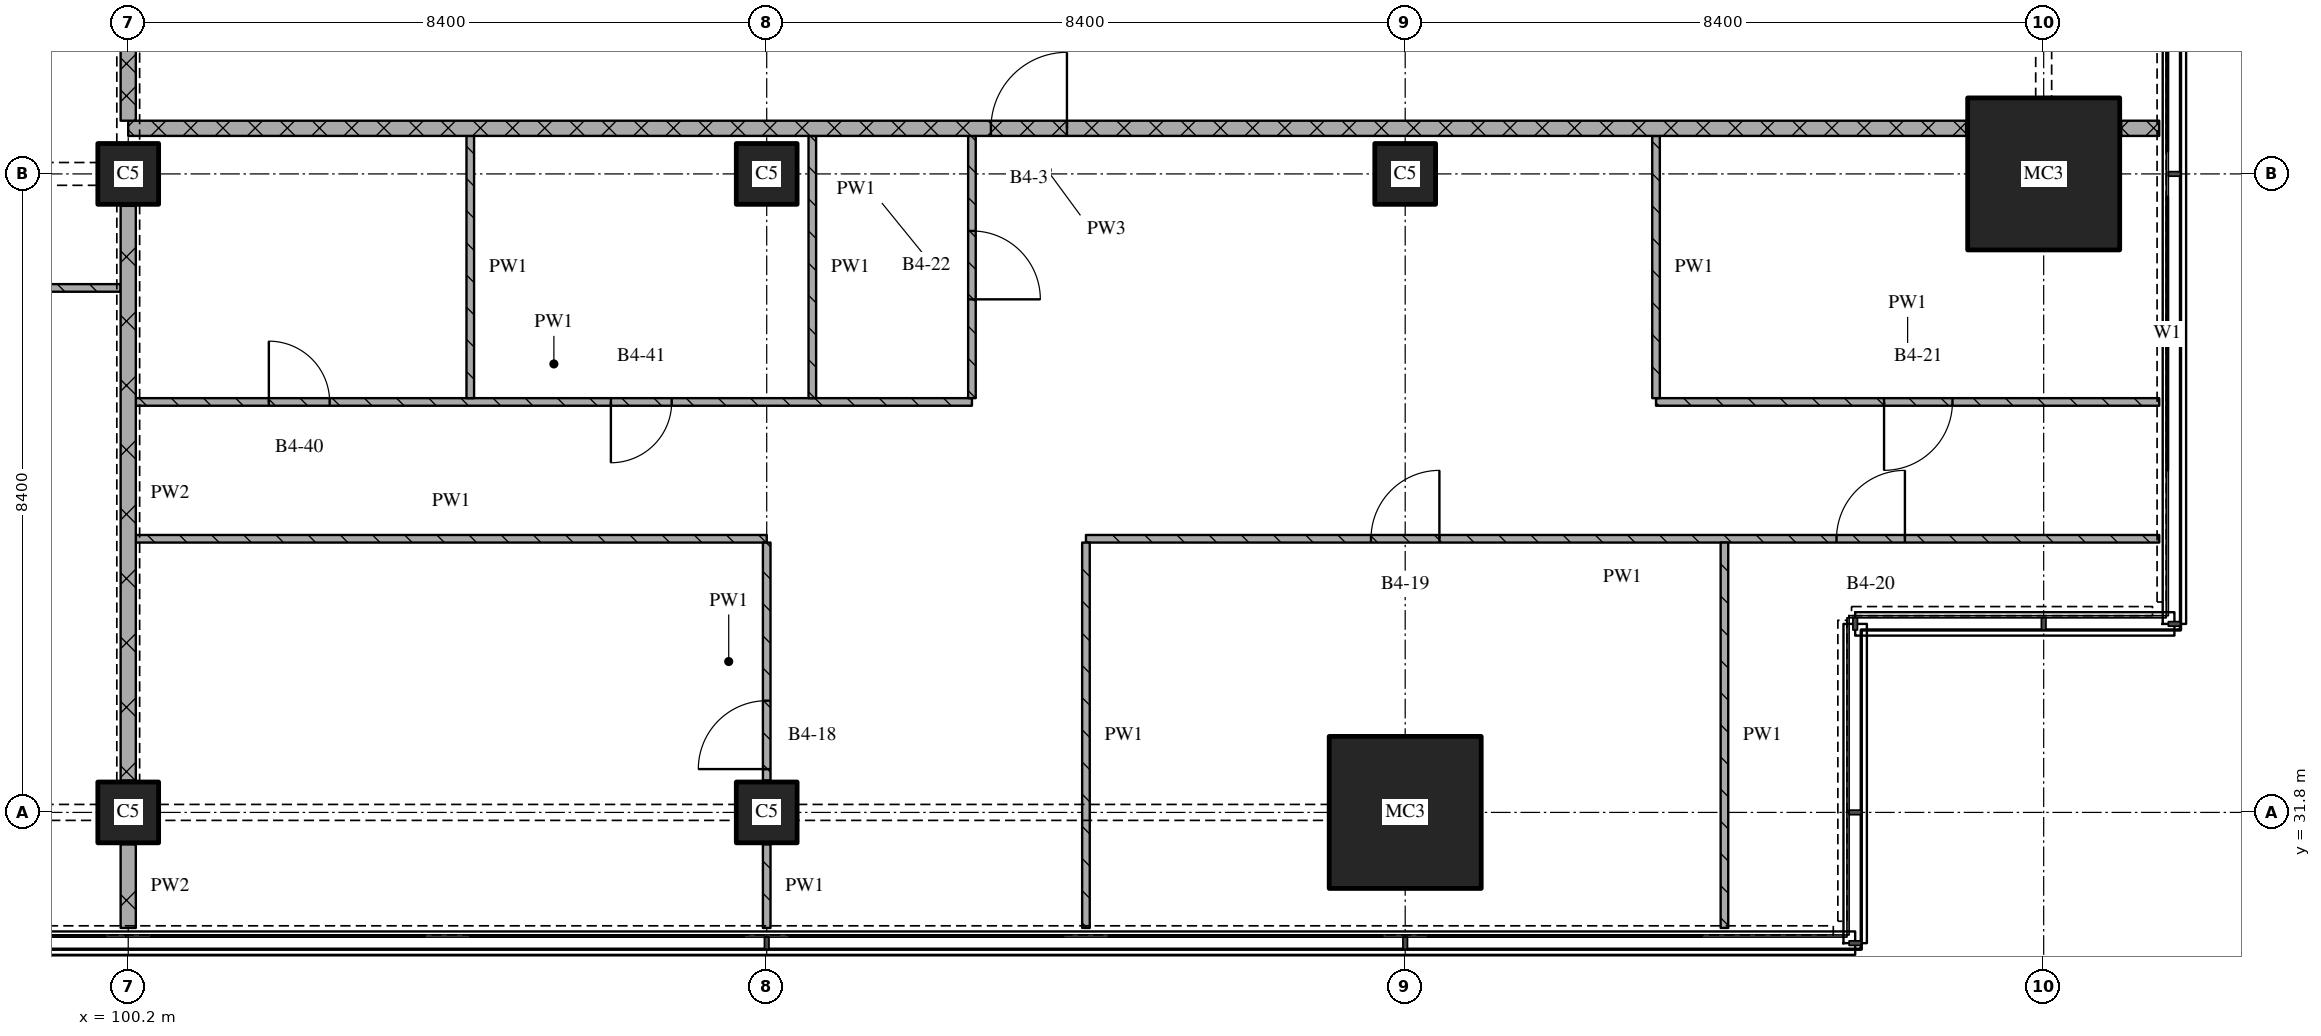
"""IFC4 building model, lengths in metres.
Left out: names, types, materials, properties, quantities, classifications, styles, units other than length and angle.
Written with IfcOpenShell. Run it as: python <this file> out.ifc"""

import sys

from ifc_helpers import new_model, si_unit, direction, frame, frame_2d, origin, origin_2d, place, context, subcontext, project, spatial, rectangle, extrude, element, fill, save


model = new_model("IFC4")
c1 = context("Model", 3, precision=1e-05, world=origin(), true_north=direction((0.0, 1.0)))
c2 = subcontext(c1, "Body", "Model", "MODEL_VIEW")
j1 = project(units=[si_unit("LENGTHUNIT", "METRE"), si_unit("PLANEANGLEUNIT", "RADIAN")], contexts=[c1])
p1 = place(None, origin())
s1 = spatial("IfcSite", under=j1, at=p1, CompositionType="ELEMENT")
p2 = place(p1, origin())
s2 = spatial("IfcBuilding", under=s1, at=p2, CompositionType="ELEMENT")
p3 = place(p2, frame((0.0, 0.0, 134.85)))
s3 = spatial("IfcBuildingStorey", under=s2, at=p3, CompositionType="ELEMENT", Elevation=134.85)
for number, where, z_axis, x_axis in (
    (1, (100.2, 31.8, 0.0), (0.0, 0.0, 1.0), (1.0, 0.0, 0.0)),
    (2, (100.2, 40.2, 0.0), (0.0, 0.0, 1.0), (1.0, 0.0, 0.0)),
    (3, (108.6, 31.8, 0.0), (0.0, 0.0, 1.0), (1.0, 0.0, 0.0)),
    (4, (108.6, 40.2, 0.0), (0.0, 0.0, 1.0), (1.0, 0.0, 0.0)),
):
    element("IfcColumn", number, at=place(p3, frame(where, z_axis=z_axis, x_axis=x_axis)), inside=s3, PredefinedType="COLUMN", context=c2, shape_type="SweptSolid", body=[
        extrude(rectangle(XDim=0.8, YDim=0.8, at=origin_2d()), origin(), (0.0, 0.0, 1.0), 3.6),
    ])
p4 = place(p3, frame((117.0, 31.8, 0.0), z_axis=(0.0, 0.0, 1.0), x_axis=(1.0, 0.0, 0.0)))
e5 = element("IfcColumn", 5, at=p4, inside=s3, PredefinedType="COLUMN", context=c2, shape_type="SweptSolid", body=[
    extrude(rectangle(XDim=2.0, YDim=2.0, at=origin_2d()), origin(), (0.0, 0.0, 1.0), 3.6),
])
p5 = place(p3, frame((117.0, 40.2, 0.0), z_axis=(0.0, 0.0, 1.0), x_axis=(1.0, 0.0, 0.0)))
e6 = element("IfcColumn", 6, at=p5, inside=s3, PredefinedType="COLUMN", context=c2, shape_type="SweptSolid", body=[
    extrude(rectangle(XDim=0.8, YDim=0.8, at=origin_2d()), origin(), (0.0, 0.0, 1.0), 3.6),
])
p6 = place(p3, frame((125.4, 40.2, 0.0), z_axis=(0.0, 0.0, 1.0), x_axis=(1.0, 0.0, 0.0)))
e7 = element("IfcColumn", 7, at=p6, inside=s3, PredefinedType="COLUMN", context=c2, shape_type="SweptSolid", body=[
    extrude(rectangle(XDim=2.0, YDim=2.0, at=origin_2d()), origin(), (0.0, 0.0, 1.0), 3.6),
])
p7 = place(p3, frame((100.3, 35.4, 0.0), z_axis=(0.0, 0.0, 1.0), x_axis=(1.0, 0.0, 0.0)))
e8 = element("IfcWall", 8, at=p7, inside=s3, PredefinedType="PARTITIONING", context=c2, shape_type="SweptSolid", body=[
    extrude(rectangle(XDim=8.3, YDim=0.1, at=frame_2d((4.15, 0.0))), origin(), (0.0, 0.0, 1.0), 3.32),
])
p8 = place(p3, frame((126.92, 35.4, 0.0), z_axis=(0.0, 0.0, 1.0), x_axis=(-1.0, 0.0, 0.0)))
e9 = element("IfcWall", 9, at=p8, inside=s3, PredefinedType="PARTITIONING", context=c2, shape_type="SweptSolid", body=[
    extrude(rectangle(XDim=14.12, YDim=0.1, at=frame_2d((7.06, 0.0))), origin(), (0.0, 0.0, 1.0), 3.32),
])
p9 = place(p8, frame((3.346, 0.0, 0.0)))
e10 = element("IfcOpeningElement", 10, at=p9, cuts=e9, PredefinedType="OPENING", context=c2, shape_type="SweptSolid", body=[
    extrude(rectangle(XDim=0.9, YDim=2.1, at=frame_2d((0.45, 1.05))), frame((0.0, 0.06, 0.0), z_axis=(0.0, -1.0, 0.0), x_axis=(1.0, 0.0, 0.0)), (0.0, 0.0, 1.0), 0.12),
])
p10 = place(p8, frame((9.47, 0.0, 0.0)))
e11 = element("IfcOpeningElement", 11, at=p10, cuts=e9, PredefinedType="OPENING", context=c2, shape_type="SweptSolid", body=[
    extrude(rectangle(XDim=0.9, YDim=2.1, at=frame_2d((0.45, 1.05))), frame((0.0, 0.06, 0.0), z_axis=(0.0, -1.0, 0.0), x_axis=(1.0, 0.0, 0.0)), (0.0, 0.0, 1.0), 0.12),
])
p11 = place(p3, frame((100.3, 37.2, 0.0), z_axis=(0.0, 0.0, 1.0), x_axis=(1.0, 0.0, 0.0)))
e12 = element("IfcWall", 12, at=p11, inside=s3, PredefinedType="PARTITIONING", context=c2, shape_type="SweptSolid", body=[
    extrude(rectangle(XDim=11.0, YDim=0.1, at=frame_2d((5.5, 0.0))), origin(), (0.0, 0.0, 1.0), 3.32),
])
p12 = place(p11, frame((1.75, 0.0, 0.0)))
e13 = element("IfcOpeningElement", 13, at=p12, cuts=e12, PredefinedType="OPENING", context=c2, shape_type="SweptSolid", body=[
    extrude(rectangle(XDim=0.8, YDim=2.1, at=frame_2d((0.4, 1.05))), frame((0.0, 0.06, 0.0), z_axis=(0.0, -1.0, 0.0), x_axis=(1.0, 0.0, 0.0)), (0.0, 0.0, 1.0), 0.12),
])
p13 = place(p11, frame((6.25, 0.0, 0.0)))
e14 = element("IfcOpeningElement", 14, at=p13, cuts=e12, PredefinedType="OPENING", context=c2, shape_type="SweptSolid", body=[
    extrude(rectangle(XDim=0.8, YDim=2.1, at=frame_2d((0.4, 1.05))), frame((0.0, 0.06, 0.0), z_axis=(0.0, -1.0, 0.0), x_axis=(1.0, 0.0, 0.0)), (0.0, 0.0, 1.0), 0.12),
])
p14 = place(p3, frame((120.3, 37.2, 0.0), z_axis=(0.0, 0.0, 1.0), x_axis=(1.0, 0.0, 0.0)))
e15 = element("IfcWall", 15, at=p14, inside=s3, PredefinedType="PARTITIONING", context=c2, shape_type="SweptSolid", body=[
    extrude(rectangle(XDim=6.62, YDim=0.1, at=frame_2d((3.31, 0.0))), origin(), (0.0, 0.0, 1.0), 3.32),
])
p15 = place(p14, frame((3.0, 0.0, 0.0)))
e16 = element("IfcOpeningElement", 16, at=p15, cuts=e15, PredefinedType="OPENING", context=c2, shape_type="SweptSolid", body=[
    extrude(rectangle(XDim=0.9, YDim=2.1, at=frame_2d((0.45, 1.05))), frame((0.0, 0.06, 0.0), z_axis=(0.0, -1.0, 0.0), x_axis=(1.0, 0.0, 0.0)), (0.0, 0.0, 1.0), 0.12),
])
p16 = place(p3, frame((91.2, 38.7, 0.0), z_axis=(0.0, 0.0, 1.0), x_axis=(1.0, 0.0, 0.0)))
e17 = element("IfcWall", 17, at=p16, inside=s3, PredefinedType="PARTITIONING", context=c2, shape_type="SweptSolid", body=[
    extrude(rectangle(XDim=8.9, YDim=0.1, at=frame_2d((4.45, 0.0))), origin(), (0.0, 0.0, 1.0), 3.32),
])
p17 = place(p16, frame((4.05, 0.0, 0.0)))
e18 = element("IfcOpeningElement", 18, at=p17, cuts=e17, PredefinedType="OPENING", context=c2, shape_type="SweptSolid", body=[
    extrude(rectangle(XDim=0.9, YDim=2.1, at=frame_2d((0.45, 1.05))), frame((0.0, 0.06, 0.0), z_axis=(0.0, -1.0, 0.0), x_axis=(1.0, 0.0, 0.0)), (0.0, 0.0, 1.0), 0.12),
])
p18 = place(p3, frame((124.38, 40.8, 0.0), z_axis=(0.0, 0.0, 1.0), x_axis=(-1.0, 0.0, 0.0)))
e19 = element("IfcWall", 19, at=p18, inside=s3, PredefinedType="PARTITIONING", context=c2, shape_type="SweptSolid", body=[
    extrude(rectangle(XDim=24.18, YDim=0.2, at=frame_2d((12.09, 0.0))), origin(), (0.0, 0.0, 1.0), 3.32),
])
p19 = place(p18, frame((11.83, 0.0, 0.0)))
e20 = element("IfcOpeningElement", 20, at=p19, cuts=e19, PredefinedType="OPENING", context=c2, shape_type="SweptSolid", body=[
    extrude(rectangle(XDim=1.0, YDim=2.1, at=frame_2d((0.5, 1.05))), frame((0.0, 0.11, 0.0), z_axis=(0.0, -1.0, 0.0), x_axis=(1.0, 0.0, 0.0)), (0.0, 0.0, 1.0), 0.22),
])
p20 = place(p3, frame((126.42, 40.8, 0.0), z_axis=(0.0, 0.0, 1.0), x_axis=(1.0, 0.0, 0.0)))
e21 = element("IfcWall", 21, at=p20, inside=s3, PredefinedType="PARTITIONING", context=c2, shape_type="SweptSolid", body=[
    extrude(rectangle(XDim=0.5, YDim=0.2, at=frame_2d((0.25, 0.0))), origin(), (0.0, 0.0, 1.0), 3.32),
])
p21 = place(p3, frame((100.2, 43.1, 0.0), z_axis=(0.0, 0.0, 1.0), x_axis=(0.0, -1.0, 0.0)))
e22 = element("IfcWall", 22, at=p21, inside=s3, PredefinedType="PARTITIONING", context=c2, shape_type="SweptSolid", body=[
    extrude(rectangle(XDim=2.2, YDim=0.2, at=frame_2d((1.1, 0.0))), origin(), (0.0, 0.0, 1.0), 2.43),
])
p22 = place(p3, frame((100.2, 31.38, 0.0), z_axis=(0.0, 0.0, 1.0), x_axis=(0.0, -1.0, 0.0)))
e23 = element("IfcWall", 23, at=p22, inside=s3, PredefinedType="PARTITIONING", context=c2, shape_type="SweptSolid", body=[
    extrude(rectangle(XDim=1.1, YDim=0.2, at=frame_2d((0.55, 0.0))), origin(), (0.0, 0.0, 1.0), 3.32),
])
p23 = place(p3, frame((100.2, 39.78, 0.0), z_axis=(0.0, 0.0, 1.0), x_axis=(0.0, -1.0, 0.0)))
e24 = element("IfcWall", 24, at=p23, inside=s3, PredefinedType="PARTITIONING", context=c2, shape_type="SweptSolid", body=[
    extrude(rectangle(XDim=7.56, YDim=0.2, at=frame_2d((3.78, 0.0))), origin(), (0.0, 0.0, 1.0), 2.83),
])
p24 = place(p3, frame((104.7, 40.7, 0.0), z_axis=(0.0, 0.0, 1.0), x_axis=(0.0, -1.0, 0.0)))
e25 = element("IfcWall", 25, at=p24, inside=s3, PredefinedType="PARTITIONING", context=c2, shape_type="SweptSolid", body=[
    extrude(rectangle(XDim=3.45, YDim=0.1, at=frame_2d((1.725, 0.0))), origin(), (0.0, 0.0, 1.0), 3.32),
])
p25 = place(p3, frame((108.6, 31.38, 0.0), z_axis=(0.0, 0.0, 1.0), x_axis=(0.0, -1.0, 0.0)))
e26 = element("IfcWall", 26, at=p25, inside=s3, PredefinedType="PARTITIONING", context=c2, shape_type="SweptSolid", body=[
    extrude(rectangle(XDim=1.1, YDim=0.1, at=frame_2d((0.55, 0.0))), origin(), (0.0, 0.0, 1.0), 3.32),
])
p26 = place(p3, frame((108.6, 32.22, 0.0), z_axis=(0.0, 0.0, 1.0), x_axis=(0.0, 1.0, 0.0)))
e27 = element("IfcWall", 27, at=p26, inside=s3, PredefinedType="PARTITIONING", context=c2, shape_type="SweptSolid", body=[
    extrude(rectangle(XDim=3.13, YDim=0.1, at=frame_2d((1.565, 0.0))), origin(), (0.0, 0.0, 1.0), 3.32),
])
p27 = place(p26, frame((0.15, 0.0, 0.0)))
e28 = element("IfcOpeningElement", 28, at=p27, cuts=e27, PredefinedType="OPENING", context=c2, shape_type="SweptSolid", body=[
    extrude(rectangle(XDim=0.9, YDim=2.1, at=frame_2d((0.45, 1.05))), frame((0.0, 0.06, 0.0), z_axis=(0.0, -1.0, 0.0), x_axis=(1.0, 0.0, 0.0)), (0.0, 0.0, 1.0), 0.12),
])
p28 = place(p3, frame((109.2, 40.7, 0.0), z_axis=(0.0, 0.0, 1.0), x_axis=(0.0, -1.0, 0.0)))
e29 = element("IfcWall", 29, at=p28, inside=s3, PredefinedType="PARTITIONING", context=c2, shape_type="SweptSolid", body=[
    extrude(rectangle(XDim=3.45, YDim=0.1, at=frame_2d((1.725, 0.0))), origin(), (0.0, 0.0, 1.0), 3.32),
])
p29 = place(p3, frame((111.3, 37.25, 0.0), z_axis=(0.0, 0.0, 1.0), x_axis=(0.0, 1.0, 0.0)))
e30 = element("IfcWall", 30, at=p29, inside=s3, PredefinedType="PARTITIONING", context=c2, shape_type="SweptSolid", body=[
    extrude(rectangle(XDim=3.45, YDim=0.1, at=frame_2d((1.725, 0.0))), origin(), (0.0, 0.0, 1.0), 3.32),
])
p30 = place(p29, frame((1.3, 0.0, 0.0)))
e31 = element("IfcOpeningElement", 31, at=p30, cuts=e30, PredefinedType="OPENING", context=c2, shape_type="SweptSolid", body=[
    extrude(rectangle(XDim=0.9, YDim=2.1, at=frame_2d((0.45, 1.05))), frame((0.0, 0.06, 0.0), z_axis=(0.0, -1.0, 0.0), x_axis=(1.0, 0.0, 0.0)), (0.0, 0.0, 1.0), 0.12),
])
p31 = place(p3, frame((112.8, 35.35, 0.0), z_axis=(0.0, 0.0, 1.0), x_axis=(0.0, -1.0, 0.0)))
e32 = element("IfcWall", 32, at=p31, inside=s3, PredefinedType="PARTITIONING", context=c2, shape_type="SweptSolid", body=[
    extrude(rectangle(XDim=5.07, YDim=0.1, at=frame_2d((2.535, 0.0))), origin(), (0.0, 0.0, 1.0), 3.32),
])
p32 = place(p3, frame((120.3, 40.7, 0.0), z_axis=(0.0, 0.0, 1.0), x_axis=(0.0, -1.0, 0.0)))
e33 = element("IfcWall", 33, at=p32, inside=s3, PredefinedType="PARTITIONING", context=c2, shape_type="SweptSolid", body=[
    extrude(rectangle(XDim=3.45, YDim=0.1, at=frame_2d((1.725, 0.0))), origin(), (0.0, 0.0, 1.0), 3.32),
])
p33 = place(p3, frame((121.2, 35.35, 0.0), z_axis=(0.0, 0.0, 1.0), x_axis=(0.0, -1.0, 0.0)))
e34 = element("IfcWall", 34, at=p33, inside=s3, PredefinedType="PARTITIONING", context=c2, shape_type="SweptSolid", body=[
    extrude(rectangle(XDim=5.07, YDim=0.1, at=frame_2d((2.535, 0.0))), origin(), (0.0, 0.0, 1.0), 3.32),
])
p34 = place(p9, origin())
e35 = element("IfcDoor", 35, at=p34, inside=s3, OperationType="SINGLE_SWING_RIGHT", PredefinedType="DOOR", context=c2, shape_type="SweptSolid", body=[
    extrude(rectangle(XDim=0.9, YDim=2.1, at=frame_2d((0.45, 1.05))), frame((0.0, 0.025, 0.0), z_axis=(0.0, -1.0, 0.0), x_axis=(1.0, 0.0, 0.0)), (0.0, 0.0, 1.0), 0.05),
])
fill(e10, e35)
p35 = place(p10, origin())
e36 = element("IfcDoor", 36, at=p35, inside=s3, OperationType="SINGLE_SWING_RIGHT", PredefinedType="DOOR", context=c2, shape_type="SweptSolid", body=[
    extrude(rectangle(XDim=0.9, YDim=2.1, at=frame_2d((0.45, 1.05))), frame((0.0, 0.025, 0.0), z_axis=(0.0, -1.0, 0.0), x_axis=(1.0, 0.0, 0.0)), (0.0, 0.0, 1.0), 0.05),
])
fill(e11, e36)
p36 = place(p12, origin())
e37 = element("IfcDoor", 37, at=p36, inside=s3, OperationType="SINGLE_SWING_LEFT", PredefinedType="DOOR", context=c2, shape_type="SweptSolid", body=[
    extrude(rectangle(XDim=0.8, YDim=2.1, at=frame_2d((0.4, 1.05))), frame((0.0, 0.025, 0.0), z_axis=(0.0, -1.0, 0.0), x_axis=(1.0, 0.0, 0.0)), (0.0, 0.0, 1.0), 0.05),
])
fill(e13, e37)
p37 = place(p13, origin())
e38 = element("IfcDoor", 38, at=p37, inside=s3, OperationType="SINGLE_SWING_RIGHT", PredefinedType="DOOR", context=c2, shape_type="SweptSolid", body=[
    extrude(rectangle(XDim=0.8, YDim=2.1, at=frame_2d((0.4, 1.05))), frame((0.0, 0.025, 0.0), z_axis=(0.0, -1.0, 0.0), x_axis=(1.0, 0.0, 0.0)), (0.0, 0.0, 1.0), 0.05),
])
fill(e14, e38)
p38 = place(p15, origin())
e39 = element("IfcDoor", 39, at=p38, inside=s3, OperationType="SINGLE_SWING_RIGHT", PredefinedType="DOOR", context=c2, shape_type="SweptSolid", body=[
    extrude(rectangle(XDim=0.9, YDim=2.1, at=frame_2d((0.45, 1.05))), frame((0.0, 0.025, 0.0), z_axis=(0.0, -1.0, 0.0), x_axis=(1.0, 0.0, 0.0)), (0.0, 0.0, 1.0), 0.05),
])
fill(e16, e39)
p39 = place(p19, origin())
e40 = element("IfcDoor", 40, at=p39, inside=s3, OperationType="SINGLE_SWING_RIGHT", PredefinedType="DOOR", context=c2, shape_type="SweptSolid", body=[
    extrude(rectangle(XDim=1.0, YDim=2.1, at=frame_2d((0.5, 1.05))), frame((0.0, 0.025, 0.0), z_axis=(0.0, -1.0, 0.0), x_axis=(1.0, 0.0, 0.0)), (0.0, 0.0, 1.0), 0.05),
])
fill(e20, e40)
p40 = place(p27, origin())
e41 = element("IfcDoor", 41, at=p40, inside=s3, OperationType="SINGLE_SWING_LEFT", PredefinedType="DOOR", context=c2, shape_type="SweptSolid", body=[
    extrude(rectangle(XDim=0.9, YDim=2.1, at=frame_2d((0.45, 1.05))), frame((0.0, 0.025, 0.0), z_axis=(0.0, -1.0, 0.0), x_axis=(1.0, 0.0, 0.0)), (0.0, 0.0, 1.0), 0.05),
])
fill(e28, e41)
p41 = place(p30, origin())
e42 = element("IfcDoor", 42, at=p41, inside=s3, OperationType="SINGLE_SWING_RIGHT", PredefinedType="DOOR", context=c2, shape_type="SweptSolid", body=[
    extrude(rectangle(XDim=0.9, YDim=2.1, at=frame_2d((0.45, 1.05))), frame((0.0, 0.025, 0.0), z_axis=(0.0, -1.0, 0.0), x_axis=(1.0, 0.0, 0.0)), (0.0, 0.0, 1.0), 0.05),
])
fill(e31, e42)
save(model, sys.argv[1])
